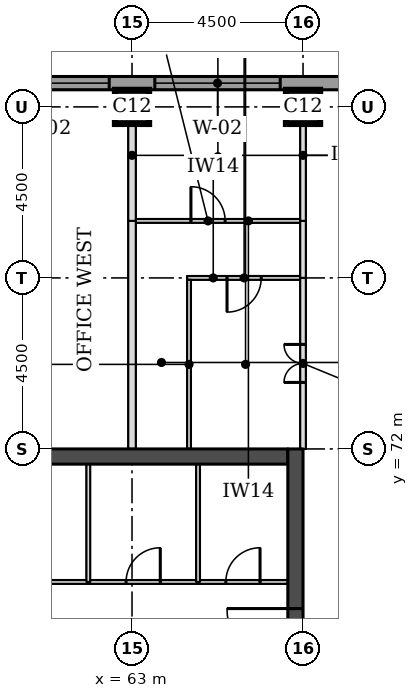
"""IFC4 building model, lengths in metres.
Left out: names, types, materials, properties, quantities, classifications, styles, units other than length and angle.
Written with IfcOpenShell. Run it as: python <this file> out.ifc"""

import sys

from ifc_helpers import new_model, si_unit, direction, frame, frame_2d, origin, origin_2d, place, context, subcontext, project, spatial, rectangle, extrude, element, fill, save


model = new_model("IFC4")
c1 = context("Model", 3, precision=1e-05, world=origin(), true_north=direction((0.0, 1.0)))
c2 = subcontext(c1, "Body", "Model", "MODEL_VIEW")
j1 = project(units=[si_unit("LENGTHUNIT", "METRE"), si_unit("PLANEANGLEUNIT", "RADIAN")], contexts=[c1])
p1 = place(None, origin())
s1 = spatial("IfcSite", under=j1, at=p1, CompositionType="ELEMENT")
p2 = place(p1, origin())
s2 = spatial("IfcBuilding", under=s1, at=p2, CompositionType="ELEMENT")
p3 = place(p2, frame((0.0, 0.0, 162.5)))
s3 = spatial("IfcBuildingStorey", under=s2, at=p3, CompositionType="ELEMENT", Elevation=162.5)
for number, where, z_axis, x_axis in (
    (1, (63.0, 81.0, 0.0), (0.0, 0.0, 1.0), (1.0, 0.0, 0.0)),
    (2, (67.5, 81.0, 0.0), (0.0, 0.0, 1.0), (1.0, 0.0, 0.0)),
):
    element("IfcColumn", number, at=place(p3, frame(where, z_axis=z_axis, x_axis=x_axis)), inside=s3, PredefinedType="COLUMN", context=c2, shape_type="SweptSolid", body=[
        extrude(rectangle(XDim=0.9, YDim=0.9, at=origin_2d()), origin(), (0.0, 0.0, 1.0), 3.7),
    ])
p4 = place(p3, frame((45.4, 71.8, 0.0), z_axis=(0.0, 0.0, 1.0), x_axis=(1.0, 0.0, 0.0)))
e3 = element("IfcWall", 3, at=p4, inside=s3, PredefinedType="SHEAR", context=c2, shape_type="SweptSolid", body=[
    extrude(rectangle(XDim=21.7, YDim=0.4, at=frame_2d((10.85, 0.0))), origin(), (0.0, 0.0, 1.0), 3.7),
])
p5 = place(p3, frame((67.3, 49.5, 0.0), z_axis=(0.0, 0.0, 1.0), x_axis=(0.0, 1.0, 0.0)))
e4 = element("IfcWall", 4, at=p5, inside=s3, PredefinedType="SHEAR", context=c2, shape_type="SweptSolid", body=[
    extrude(rectangle(XDim=22.5, YDim=0.4, at=frame_2d((11.25, 0.0))), origin(), (0.0, 0.0, 1.0), 3.7),
])
p6 = place(p5, frame((4.2, 0.0, 0.0)))
e5 = element("IfcOpeningElement", 5, at=p6, cuts=e4, PredefinedType="OPENING", context=c2, shape_type="SweptSolid", body=[
    extrude(rectangle(XDim=1.8, YDim=2.1, at=frame_2d((0.9, 1.05))), frame((0.0, 0.21, 0.0), z_axis=(0.0, -1.0, 0.0), x_axis=(1.0, 0.0, 0.0)), (0.0, 0.0, 1.0), 0.42),
])
p7 = place(p5, frame((6.9, 0.0, 0.0)))
e6 = element("IfcOpeningElement", 6, at=p7, cuts=e4, PredefinedType="OPENING", context=c2, shape_type="SweptSolid", body=[
    extrude(rectangle(XDim=1.1, YDim=2.1, at=frame_2d((0.55, 1.05))), frame((0.0, 0.21, 0.0), z_axis=(0.0, -1.0, 0.0), x_axis=(1.0, 0.0, 0.0)), (0.0, 0.0, 1.0), 0.42),
])
p8 = place(p5, frame((13.6, 0.0, 0.0)))
e7 = element("IfcOpeningElement", 7, at=p8, cuts=e4, PredefinedType="OPENING", context=c2, shape_type="SweptSolid", body=[
    extrude(rectangle(XDim=1.1, YDim=2.1, at=frame_2d((0.55, 1.05))), frame((0.0, 0.21, 0.0), z_axis=(0.0, -1.0, 0.0), x_axis=(1.0, 0.0, 0.0)), (0.0, 0.0, 1.0), 0.42),
])
p9 = place(p5, frame((16.5, 0.0, 0.0)))
e8 = element("IfcOpeningElement", 8, at=p9, cuts=e4, PredefinedType="OPENING", context=c2, shape_type="SweptSolid", body=[
    extrude(rectangle(XDim=1.8, YDim=2.1, at=frame_2d((0.9, 1.05))), frame((0.0, 0.21, 0.0), z_axis=(0.0, -1.0, 0.0), x_axis=(1.0, 0.0, 0.0)), (0.0, 0.0, 1.0), 0.42),
])
p10 = place(p3, frame((72.331, 81.625, 0.0), z_axis=(0.0, 0.0, 1.0), x_axis=(-1.0, 0.0, 0.0)))
e9 = element("IfcWall", 9, at=p10, inside=s3, PredefinedType="STANDARD", context=c2, shape_type="SweptSolid", body=[
    extrude(rectangle(XDim=32.163, YDim=0.35, at=frame_2d((16.081, 0.0))), origin(), (0.0, 0.0, 1.0), 3.525),
])
p11 = place(p10, frame((5.431, 0.0, 0.9)))
e10 = element("IfcOpeningElement", 10, at=p11, cuts=e9, PredefinedType="OPENING", context=c2, shape_type="SweptSolid", body=[
    extrude(rectangle(XDim=3.3, YDim=1.9, at=frame_2d((1.65, 0.95))), frame((0.0, 0.185, 0.0), z_axis=(0.0, -1.0, 0.0), x_axis=(1.0, 0.0, 0.0)), (0.0, 0.0, 1.0), 0.37),
])
p12 = place(p10, frame((9.931, 0.0, 0.9)))
e11 = element("IfcOpeningElement", 11, at=p12, cuts=e9, PredefinedType="OPENING", context=c2, shape_type="SweptSolid", body=[
    extrude(rectangle(XDim=3.3, YDim=1.9, at=frame_2d((1.65, 0.95))), frame((0.0, 0.185, 0.0), z_axis=(0.0, -1.0, 0.0), x_axis=(1.0, 0.0, 0.0)), (0.0, 0.0, 1.0), 0.37),
])
p13 = place(p10, frame((14.431, 0.0, 0.9)))
e12 = element("IfcOpeningElement", 12, at=p13, cuts=e9, PredefinedType="OPENING", context=c2, shape_type="SweptSolid", body=[
    extrude(rectangle(XDim=3.3, YDim=1.9, at=frame_2d((1.65, 0.95))), frame((0.0, 0.185, 0.0), z_axis=(0.0, -1.0, 0.0), x_axis=(1.0, 0.0, 0.0)), (0.0, 0.0, 1.0), 0.37),
])
p14 = place(p10, frame((18.931, 0.0, 0.9)))
e13 = element("IfcOpeningElement", 13, at=p14, cuts=e9, PredefinedType="OPENING", context=c2, shape_type="SweptSolid", body=[
    extrude(rectangle(XDim=3.3, YDim=1.9, at=frame_2d((1.65, 0.95))), frame((0.0, 0.185, 0.0), z_axis=(0.0, -1.0, 0.0), x_axis=(1.0, 0.0, 0.0)), (0.0, 0.0, 1.0), 0.37),
])
p15 = place(p10, frame((23.431, 0.0, 0.9)))
e14 = element("IfcOpeningElement", 14, at=p15, cuts=e9, PredefinedType="OPENING", context=c2, shape_type="SweptSolid", body=[
    extrude(rectangle(XDim=3.3, YDim=1.9, at=frame_2d((1.65, 0.95))), frame((0.0, 0.185, 0.0), z_axis=(0.0, -1.0, 0.0), x_axis=(1.0, 0.0, 0.0)), (0.0, 0.0, 1.0), 0.37),
])
p16 = place(p3, frame((64.45, 76.5, 0.0), z_axis=(0.0, 0.0, 1.0), x_axis=(1.0, 0.0, 0.0)))
e15 = element("IfcWall", 15, at=p16, inside=s3, PredefinedType="PARTITIONING", context=c2, shape_type="SweptSolid", body=[
    extrude(rectangle(XDim=2.975, YDim=0.1, at=frame_2d((1.488, 0.0))), origin(), (0.0, 0.0, 1.0), 3.55),
])
p17 = place(p16, frame((1.05, 0.0, 0.0)))
e16 = element("IfcOpeningElement", 16, at=p17, cuts=e15, PredefinedType="OPENING", context=c2, shape_type="SweptSolid", body=[
    extrude(rectangle(XDim=0.9, YDim=2.1, at=frame_2d((0.45, 1.05))), frame((0.0, 0.06, 0.0), z_axis=(0.0, -1.0, 0.0), x_axis=(1.0, 0.0, 0.0)), (0.0, 0.0, 1.0), 0.12),
])
p18 = place(p3, frame((63.1, 78.0, 0.0), z_axis=(0.0, 0.0, 1.0), x_axis=(1.0, 0.0, 0.0)))
e17 = element("IfcWall", 17, at=p18, inside=s3, PredefinedType="PARTITIONING", context=c2, shape_type="SweptSolid", body=[
    extrude(rectangle(XDim=4.325, YDim=0.1, at=frame_2d((2.163, 0.0))), origin(), (0.0, 0.0, 1.0), 3.55),
])
p19 = place(p18, frame((1.45, 0.0, 0.0)))
e18 = element("IfcOpeningElement", 18, at=p19, cuts=e17, PredefinedType="OPENING", context=c2, shape_type="SweptSolid", body=[
    extrude(rectangle(XDim=0.9, YDim=2.1, at=frame_2d((0.45, 1.05))), frame((0.0, 0.06, 0.0), z_axis=(0.0, -1.0, 0.0), x_axis=(1.0, 0.0, 0.0)), (0.0, 0.0, 1.0), 0.12),
])
p20 = place(p3, frame((63.0, 72.0, 0.0), z_axis=(0.0, 0.0, 1.0), x_axis=(0.0, 1.0, 0.0)))
e19 = element("IfcWall", 19, at=p20, inside=s3, PredefinedType="PARTITIONING", context=c2, shape_type="SweptSolid", body=[
    extrude(rectangle(XDim=6.0, YDim=0.2, at=frame_2d((3.0, 0.0))), origin(), (0.0, 0.0, 1.0), 3.55),
])
p21 = place(p3, frame((64.5, 72.0, 0.0), z_axis=(0.0, 0.0, 1.0), x_axis=(0.0, 1.0, 0.0)))
e20 = element("IfcWall", 20, at=p21, inside=s3, PredefinedType="PARTITIONING", context=c2, shape_type="SweptSolid", body=[
    extrude(rectangle(XDim=4.45, YDim=0.1, at=frame_2d((2.225, 0.0))), origin(), (0.0, 0.0, 1.0), 3.55),
])
p22 = place(p3, frame((67.5, 72.0, 0.0), z_axis=(0.0, 0.0, 1.0), x_axis=(0.0, 1.0, 0.0)))
e21 = element("IfcWall", 21, at=p22, inside=s3, PredefinedType="PARTITIONING", context=c2, shape_type="SweptSolid", body=[
    extrude(rectangle(XDim=4.5, YDim=0.15, at=frame_2d((2.25, 0.0))), origin(), (0.0, 0.0, 1.0), 3.022),
])
p23 = place(p22, frame((1.75, 0.0, 0.0)))
e22 = element("IfcOpeningElement", 22, at=p23, cuts=e21, PredefinedType="OPENING", context=c2, shape_type="SweptSolid", body=[
    extrude(rectangle(XDim=1.0, YDim=2.1, at=frame_2d((0.5, 1.05))), frame((0.0, 0.085, 0.0), z_axis=(0.0, -1.0, 0.0), x_axis=(1.0, 0.0, 0.0)), (0.0, 0.0, 1.0), 0.17),
])
p24 = place(p3, frame((67.5, 76.5, 0.0), z_axis=(0.0, 0.0, 1.0), x_axis=(0.0, 1.0, 0.0)))
e23 = element("IfcWall", 23, at=p24, inside=s3, PredefinedType="PARTITIONING", context=c2, shape_type="SweptSolid", body=[
    extrude(rectangle(XDim=1.5, YDim=0.15, at=frame_2d((0.75, 0.0))), origin(), (0.0, 0.0, 1.0), 3.022),
])
p25 = place(p3, frame((63.0, 78.0, 0.0), z_axis=(0.0, 0.0, 1.0), x_axis=(0.0, 1.0, 0.0)))
e24 = element("IfcWall", 24, at=p25, inside=s3, PredefinedType="PARTITIONING", context=c2, shape_type="SweptSolid", body=[
    extrude(rectangle(XDim=3.45, YDim=0.2, at=frame_2d((1.725, 0.0))), origin(), (0.0, 0.0, 1.0), 3.55),
])
p26 = place(p3, frame((67.5, 78.0, 0.0), z_axis=(0.0, 0.0, 1.0), x_axis=(0.0, 1.0, 0.0)))
e25 = element("IfcWall", 25, at=p26, inside=s3, PredefinedType="PARTITIONING", context=c2, shape_type="SweptSolid", body=[
    extrude(rectangle(XDim=3.45, YDim=0.15, at=frame_2d((1.725, 0.0))), origin(), (0.0, 0.0, 1.0), 3.022),
])
p27 = place(p3, frame((45.4, 68.5, 0.0), z_axis=(0.0, 0.0, 1.0), x_axis=(1.0, 0.0, 0.0)))
e26 = element("IfcWall", 26, at=p27, inside=s3, PredefinedType="PARTITIONING", context=c2, shape_type="SweptSolid", body=[
    extrude(rectangle(XDim=21.7, YDim=0.1, at=frame_2d((10.85, 0.0))), origin(), (0.0, 0.0, 1.0), 3.55),
])
p28 = place(p27, frame((20.069, 0.0, 0.0)))
e27 = element("IfcOpeningElement", 27, at=p28, cuts=e26, PredefinedType="OPENING", context=c2, shape_type="SweptSolid", body=[
    extrude(rectangle(XDim=0.9, YDim=2.1, at=frame_2d((0.45, 1.05))), frame((0.0, 0.06, 0.0), z_axis=(0.0, -1.0, 0.0), x_axis=(1.0, 0.0, 0.0)), (0.0, 0.0, 1.0), 0.12),
])
p29 = place(p27, frame((17.444, 0.0, 0.0)))
e28 = element("IfcOpeningElement", 28, at=p29, cuts=e26, PredefinedType="OPENING", context=c2, shape_type="SweptSolid", body=[
    extrude(rectangle(XDim=0.9, YDim=2.1, at=frame_2d((0.45, 1.05))), frame((0.0, 0.06, 0.0), z_axis=(0.0, -1.0, 0.0), x_axis=(1.0, 0.0, 0.0)), (0.0, 0.0, 1.0), 0.12),
])
p30 = place(p27, frame((2.175, 0.0, 0.0)))
e29 = element("IfcOpeningElement", 29, at=p30, cuts=e26, PredefinedType="OPENING", context=c2, shape_type="SweptSolid", body=[
    extrude(rectangle(XDim=0.9, YDim=2.1, at=frame_2d((0.45, 1.05))), frame((0.0, 0.06, 0.0), z_axis=(0.0, -1.0, 0.0), x_axis=(1.0, 0.0, 0.0)), (0.0, 0.0, 1.0), 0.12),
])
p31 = place(p27, frame((14.208, 0.0, 0.0)))
e30 = element("IfcOpeningElement", 30, at=p31, cuts=e26, PredefinedType="OPENING", context=c2, shape_type="SweptSolid", body=[
    extrude(rectangle(XDim=0.9, YDim=2.1, at=frame_2d((0.45, 1.05))), frame((0.0, 0.06, 0.0), z_axis=(0.0, -1.0, 0.0), x_axis=(1.0, 0.0, 0.0)), (0.0, 0.0, 1.0), 0.12),
])
p32 = place(p27, frame((10.96, 0.0, 0.0)))
e31 = element("IfcOpeningElement", 31, at=p32, cuts=e26, PredefinedType="OPENING", context=c2, shape_type="SweptSolid", body=[
    extrude(rectangle(XDim=0.9, YDim=2.1, at=frame_2d((0.45, 1.05))), frame((0.0, 0.06, 0.0), z_axis=(0.0, -1.0, 0.0), x_axis=(1.0, 0.0, 0.0)), (0.0, 0.0, 1.0), 0.12),
])
p33 = place(p27, frame((8.272, 0.0, 0.0)))
e32 = element("IfcOpeningElement", 32, at=p33, cuts=e26, PredefinedType="OPENING", context=c2, shape_type="SweptSolid", body=[
    extrude(rectangle(XDim=0.9, YDim=2.1, at=frame_2d((0.45, 1.05))), frame((0.0, 0.06, 0.0), z_axis=(0.0, -1.0, 0.0), x_axis=(1.0, 0.0, 0.0)), (0.0, 0.0, 1.0), 0.12),
])
p34 = place(p27, frame((5.92, 0.0, 0.0)))
e33 = element("IfcOpeningElement", 33, at=p34, cuts=e26, PredefinedType="OPENING", context=c2, shape_type="SweptSolid", body=[
    extrude(rectangle(XDim=0.9, YDim=2.1, at=frame_2d((0.45, 1.05))), frame((0.0, 0.06, 0.0), z_axis=(0.0, -1.0, 0.0), x_axis=(1.0, 0.0, 0.0)), (0.0, 0.0, 1.0), 0.12),
])
for number, where, z_axis, x_axis in (
    (34, (61.85, 68.5, 0.0), (0.0, 0.0, 1.0), (0.0, 1.0, 0.0)),
    (35, (64.738, 68.5, 0.0), (0.0, 0.0, 1.0), (0.0, 1.0, 0.0)),
):
    element("IfcWall", number, at=place(p3, frame(where, z_axis=z_axis, x_axis=x_axis)), inside=s3, PredefinedType="PARTITIONING", context=c2, shape_type="SweptSolid", body=[
        extrude(rectangle(XDim=3.1, YDim=0.1, at=frame_2d((1.55, 0.0))), origin(), (0.0, 0.0, 1.0), 3.55),
    ])
p35 = place(p11, origin())
e36 = element("IfcWindow", 36, at=p35, inside=s3, PartitioningType="SINGLE_PANEL", PredefinedType="WINDOW", context=c2, shape_type="SweptSolid", body=[
    extrude(rectangle(XDim=3.3, YDim=1.9, at=frame_2d((1.65, 0.95))), frame((0.0, 0.085, 0.0), z_axis=(0.0, -1.0, 0.0), x_axis=(1.0, 0.0, 0.0)), (0.0, 0.0, 1.0), 0.06),
])
fill(e10, e36)
p36 = place(p12, origin())
e37 = element("IfcWindow", 37, at=p36, inside=s3, PartitioningType="SINGLE_PANEL", PredefinedType="WINDOW", context=c2, shape_type="SweptSolid", body=[
    extrude(rectangle(XDim=3.3, YDim=1.9, at=frame_2d((1.65, 0.95))), frame((0.0, 0.085, 0.0), z_axis=(0.0, -1.0, 0.0), x_axis=(1.0, 0.0, 0.0)), (0.0, 0.0, 1.0), 0.06),
])
fill(e11, e37)
p37 = place(p23, origin())
e38 = element("IfcDoor", 38, at=p37, inside=s3, OperationType="DOUBLE_DOOR_SINGLE_SWING", PredefinedType="DOOR", context=c2, shape_type="SweptSolid", body=[
    extrude(rectangle(XDim=1.0, YDim=2.1, at=frame_2d((0.5, 1.05))), frame((0.0, 0.025, 0.0), z_axis=(0.0, -1.0, 0.0), x_axis=(1.0, 0.0, 0.0)), (0.0, 0.0, 1.0), 0.05),
])
fill(e22, e38)
p38 = place(p17, frame((0.9, 0.0, 0.0), z_axis=(0.0, 0.0, 1.0), x_axis=(-1.0, 0.0, 0.0)))
e39 = element("IfcDoor", 39, at=p38, inside=s3, OperationType="SINGLE_SWING_RIGHT", PredefinedType="DOOR", context=c2, shape_type="SweptSolid", body=[
    extrude(rectangle(XDim=0.9, YDim=2.1, at=frame_2d((0.45, 1.05))), frame((0.0, 0.025, 0.0), z_axis=(0.0, -1.0, 0.0), x_axis=(1.0, 0.0, 0.0)), (0.0, 0.0, 1.0), 0.05),
])
fill(e16, e39)
p39 = place(p19, origin())
e40 = element("IfcDoor", 40, at=p39, inside=s3, OperationType="SINGLE_SWING_LEFT", PredefinedType="DOOR", context=c2, shape_type="SweptSolid", body=[
    extrude(rectangle(XDim=0.9, YDim=2.1, at=frame_2d((0.45, 1.05))), frame((0.0, 0.025, 0.0), z_axis=(0.0, -1.0, 0.0), x_axis=(1.0, 0.0, 0.0)), (0.0, 0.0, 1.0), 0.05),
])
fill(e18, e40)
p40 = place(p9, origin())
e41 = element("IfcDoor", 41, at=p40, inside=s3, OperationType="SINGLE_SWING_RIGHT", PredefinedType="DOOR", context=c2, shape_type="SweptSolid", body=[
    extrude(rectangle(XDim=1.8, YDim=2.1, at=frame_2d((0.9, 1.05))), frame((0.0, 0.025, 0.0), z_axis=(0.0, -1.0, 0.0), x_axis=(1.0, 0.0, 0.0)), (0.0, 0.0, 1.0), 0.05),
])
fill(e8, e41)
p41 = place(p28, origin())
e42 = element("IfcDoor", 42, at=p41, inside=s3, OperationType="SINGLE_SWING_RIGHT", PredefinedType="DOOR", context=c2, shape_type="SweptSolid", body=[
    extrude(rectangle(XDim=0.9, YDim=2.1, at=frame_2d((0.45, 1.05))), frame((0.0, 0.025, 0.0), z_axis=(0.0, -1.0, 0.0), x_axis=(1.0, 0.0, 0.0)), (0.0, 0.0, 1.0), 0.05),
])
fill(e27, e42)
p42 = place(p29, origin())
e43 = element("IfcDoor", 43, at=p42, inside=s3, OperationType="SINGLE_SWING_RIGHT", PredefinedType="DOOR", context=c2, shape_type="SweptSolid", body=[
    extrude(rectangle(XDim=0.9, YDim=2.1, at=frame_2d((0.45, 1.05))), frame((0.0, 0.025, 0.0), z_axis=(0.0, -1.0, 0.0), x_axis=(1.0, 0.0, 0.0)), (0.0, 0.0, 1.0), 0.05),
])
fill(e28, e43)
save(model, sys.argv[1])
